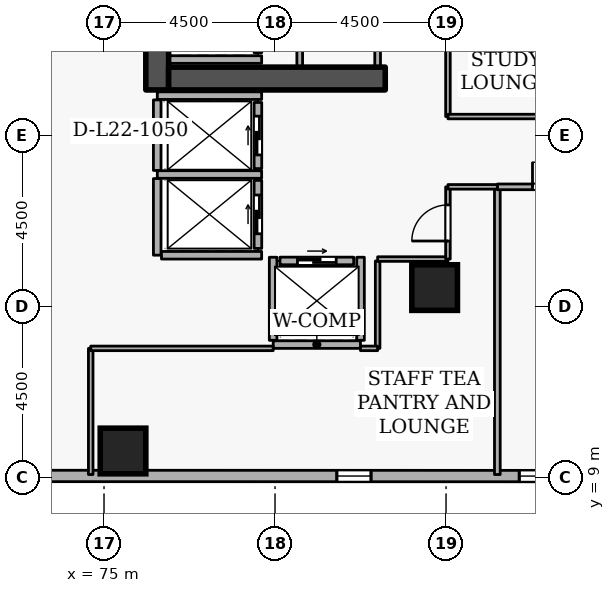
"""IFC4 building model, lengths in metres.
Left out: names, types, materials, properties, quantities, classifications, styles, units other than length and angle.
Written with IfcOpenShell. Run it as: python <this file> out.ifc"""

import sys

from ifc_helpers import new_model, si_unit, direction, frame, frame_2d, origin, origin_2d, place, context, subcontext, project, spatial, rectangle, extrude, element, fill, save


model = new_model("IFC4")
c1 = context("Model", 3, precision=1e-05, world=origin(), true_north=direction((0.0, 1.0)))
c2 = subcontext(c1, "Body", "Model", "MODEL_VIEW")
j1 = project(units=[si_unit("LENGTHUNIT", "METRE"), si_unit("PLANEANGLEUNIT", "RADIAN")], contexts=[c1])
p1 = place(None, origin())
s1 = spatial("IfcSite", under=j1, at=p1, CompositionType="ELEMENT")
p2 = place(p1, origin())
s2 = spatial("IfcBuilding", under=s1, at=p2, CompositionType="ELEMENT")
p3 = place(p2, frame((0.0, 0.0, 87.3)))
s3 = spatial("IfcBuildingStorey", under=s2, at=p3, CompositionType="ELEMENT", Elevation=87.3)
p4 = place(p3, frame((76.4, 19.2, 0.0), z_axis=(0.0, 0.0, 1.0), x_axis=(0.0, 1.0, 0.0)))
e1 = element("IfcWall", 1, at=p4, inside=s3, PredefinedType="SHEAR", context=c2, shape_type="SweptSolid", body=[
    extrude(rectangle(XDim=15.6, YDim=0.6, at=frame_2d((7.8, 0.0))), origin(), (0.0, 0.0, 1.0), 3.6),
])
p5 = place(p3, frame((76.7, 19.5, 0.0), z_axis=(0.0, 0.0, 1.0), x_axis=(1.0, 0.0, 0.0)))
e2 = element("IfcWall", 2, at=p5, inside=s3, PredefinedType="SHEAR", context=c2, shape_type="SweptSolid", body=[
    extrude(rectangle(XDim=5.7, YDim=0.6, at=frame_2d((2.85, 0.0))), origin(), (0.0, 0.0, 1.0), 3.6),
])
for number, where, z_axis, x_axis in (
    (3, (75.5, 9.7, 0.0), (0.0, 0.0, 1.0), (1.0, 0.0, 0.0)),
    (4, (83.7, 14.0, 0.0), (0.0, 0.0, 1.0), (1.0, 0.0, 0.0)),
):
    element("IfcColumn", number, at=place(p3, frame(where, z_axis=z_axis, x_axis=x_axis)), inside=s3, PredefinedType="COLUMN", context=c2, shape_type="SweptSolid", body=[
        extrude(rectangle(XDim=1.2, YDim=1.2, at=origin_2d()), origin(), (0.0, 0.0, 1.0), 3.6),
    ])
p6 = place(p3, frame((69.726, 9.044, 0.0), z_axis=(0.0, 0.0, 1.0), x_axis=(0.999999970468, -0.000243032466, 0.0)))
e5 = element("IfcWall", 5, at=p6, inside=s3, PredefinedType="STANDARD", context=c2, shape_type="SweptSolid", body=[
    extrude(rectangle(XDim=34.155, YDim=0.3, at=frame_2d((17.078, 0.0))), origin(), (0.0, 0.0, 1.0), 2.7),
])
p7 = place(p6, frame((1.8, 0.0, 0.72)))
e6 = element("IfcOpeningElement", 6, at=p7, cuts=e5, PredefinedType="OPENING", context=c2, shape_type="SweptSolid", body=[
    extrude(rectangle(XDim=0.9, YDim=1.75, at=frame_2d((0.45, 0.875))), frame((0.0, 0.16, 0.0), z_axis=(0.0, -1.0, 0.0), x_axis=(1.0, 0.0, 0.0)), (0.0, 0.0, 1.0), 0.32),
])
p8 = place(p6, frame((11.4, 0.0, 0.72)))
e7 = element("IfcOpeningElement", 7, at=p8, cuts=e5, PredefinedType="OPENING", context=c2, shape_type="SweptSolid", body=[
    extrude(rectangle(XDim=0.9, YDim=1.75, at=frame_2d((0.45, 0.875))), frame((0.0, 0.16, 0.0), z_axis=(0.0, -1.0, 0.0), x_axis=(1.0, 0.0, 0.0)), (0.0, 0.0, 1.0), 0.32),
])
p9 = place(p6, frame((16.2, 0.0, 0.72)))
e8 = element("IfcOpeningElement", 8, at=p9, cuts=e5, PredefinedType="OPENING", context=c2, shape_type="SweptSolid", body=[
    extrude(rectangle(XDim=0.9, YDim=1.75, at=frame_2d((0.45, 0.875))), frame((0.0, 0.16, 0.0), z_axis=(0.0, -1.0, 0.0), x_axis=(1.0, 0.0, 0.0)), (0.0, 0.0, 1.0), 0.32),
])
p10 = place(p6, frame((21.0, 0.0, 0.72)))
e9 = element("IfcOpeningElement", 9, at=p10, cuts=e5, PredefinedType="OPENING", context=c2, shape_type="SweptSolid", body=[
    extrude(rectangle(XDim=0.9, YDim=1.75, at=frame_2d((0.45, 0.875))), frame((0.0, 0.16, 0.0), z_axis=(0.0, -1.0, 0.0), x_axis=(1.0, 0.0, 0.0)), (0.0, 0.0, 1.0), 0.32),
])
p11 = place(p6, frame((25.8, 0.0, 0.72)))
e10 = element("IfcOpeningElement", 10, at=p11, cuts=e5, PredefinedType="OPENING", context=c2, shape_type="SweptSolid", body=[
    extrude(rectangle(XDim=0.9, YDim=1.75, at=frame_2d((0.45, 0.875))), frame((0.0, 0.16, 0.0), z_axis=(0.0, -1.0, 0.0), x_axis=(1.0, 0.0, 0.0)), (0.0, 0.0, 1.0), 0.32),
])
p12 = place(p3, frame((79.05, 20.18, 0.0), z_axis=(0.0, 0.0, 1.0), x_axis=(0.0, 1.0, 0.0)))
e11 = element("IfcWall", 11, at=p12, inside=s3, PredefinedType="STANDARD", context=c2, shape_type="SweptSolid", body=[
    extrude(rectangle(XDim=1.94, YDim=0.2, at=frame_2d((0.97, 0.0))), origin(), (0.0, 0.0, 1.0), 3.34),
])
p13 = place(p3, frame((79.05, 17.13, 0.0), z_axis=(0.0, 0.0, 1.0), x_axis=(0.0, 1.0, 0.0)))
e12 = element("IfcWall", 12, at=p13, inside=s3, PredefinedType="STANDARD", context=c2, shape_type="SweptSolid", body=[
    extrude(rectangle(XDim=1.74, YDim=0.2, at=frame_2d((0.87, 0.0))), origin(), (0.0, 0.0, 1.0), 3.34),
])
p14 = place(p13, frame((0.36, 0.0, 0.0)))
e13 = element("IfcOpeningElement", 13, at=p14, cuts=e12, PredefinedType="OPENING", context=c2, shape_type="SweptSolid", body=[
    extrude(rectangle(XDim=1.02, YDim=2.06, at=frame_2d((0.51, 1.03))), frame((0.0, 0.11, 0.0), z_axis=(0.0, -1.0, 0.0), x_axis=(1.0, 0.0, 0.0)), (0.0, 0.0, 1.0), 0.22),
])
p15 = place(p3, frame((79.05, 15.03, 0.0), z_axis=(0.0, 0.0, 1.0), x_axis=(0.0, 1.0, 0.0)))
e14 = element("IfcWall", 14, at=p15, inside=s3, PredefinedType="STANDARD", context=c2, shape_type="SweptSolid", body=[
    extrude(rectangle(XDim=1.79, YDim=0.2, at=frame_2d((0.895, 0.0))), origin(), (0.0, 0.0, 1.0), 3.34),
])
p16 = place(p15, frame((0.385, 0.0, 0.0)))
e15 = element("IfcOpeningElement", 15, at=p16, cuts=e14, PredefinedType="OPENING", context=c2, shape_type="SweptSolid", body=[
    extrude(rectangle(XDim=1.02, YDim=2.06, at=frame_2d((0.51, 1.03))), frame((0.0, 0.11, 0.0), z_axis=(0.0, -1.0, 0.0), x_axis=(1.0, 0.0, 0.0)), (0.0, 0.0, 1.0), 0.22),
])
p17 = place(p3, frame((79.63, 14.7, 0.0), z_axis=(0.0, 0.0, 1.0), x_axis=(1.0, 0.0, 0.0)))
e16 = element("IfcWall", 16, at=p17, inside=s3, PredefinedType="STANDARD", context=c2, shape_type="SweptSolid", body=[
    extrude(rectangle(XDim=1.94, YDim=0.2, at=frame_2d((0.97, 0.0))), origin(), (0.0, 0.0, 1.0), 3.34),
])
p18 = place(p17, frame((0.46, 0.0, 0.0)))
e17 = element("IfcOpeningElement", 17, at=p18, cuts=e16, PredefinedType="OPENING", context=c2, shape_type="SweptSolid", body=[
    extrude(rectangle(XDim=1.02, YDim=2.06, at=frame_2d((0.51, 1.03))), frame((0.0, 0.11, 0.0), z_axis=(0.0, -1.0, 0.0), x_axis=(1.0, 0.0, 0.0)), (0.0, 0.0, 1.0), 0.22),
])
p19 = place(p3, frame((76.712, 20.0, 0.0), z_axis=(0.0, 0.0, 1.0), x_axis=(1.0, 0.0, 0.0)))
e18 = element("IfcWall", 18, at=p19, inside=s3, PredefinedType="STANDARD", context=c2, shape_type="SweptSolid", body=[
    extrude(rectangle(XDim=2.436, YDim=0.2, at=frame_2d((1.218, 0.0))), origin(), (0.0, 0.0, 1.0), 3.34),
])
p20 = place(p3, frame((76.402, 19.05, 0.0), z_axis=(0.0, 0.0, 1.0), x_axis=(1.0, 0.0, 0.0)))
e19 = element("IfcWall", 19, at=p20, inside=s3, PredefinedType="STANDARD", context=c2, shape_type="SweptSolid", body=[
    extrude(rectangle(XDim=2.746, YDim=0.2, at=frame_2d((1.373, 0.0))), origin(), (0.0, 0.0, 1.0), 2.545),
])
p21 = place(p3, frame((76.402, 16.975, 0.0), z_axis=(0.0, 0.0, 1.0), x_axis=(1.0, 0.0, 0.0)))
e20 = element("IfcWall", 20, at=p21, inside=s3, PredefinedType="STANDARD", context=c2, shape_type="SweptSolid", body=[
    extrude(rectangle(XDim=2.746, YDim=0.2, at=frame_2d((1.373, 0.0))), origin(), (0.0, 0.0, 1.0), 3.34),
])
p22 = place(p3, frame((76.4, 14.852, 0.0), z_axis=(0.0, 0.0, 1.0), x_axis=(0.0, 1.0, 0.0)))
e21 = element("IfcWall", 21, at=p22, inside=s3, PredefinedType="STANDARD", context=c2, shape_type="SweptSolid", body=[
    extrude(rectangle(XDim=2.016, YDim=0.2, at=frame_2d((1.008, 0.0))), origin(), (0.0, 0.0, 1.0), 3.34),
])
p23 = place(p3, frame((76.4, 17.082, 0.0), z_axis=(0.0, 0.0, 1.0), x_axis=(0.0, 1.0, 0.0)))
e22 = element("IfcWall", 22, at=p23, inside=s3, PredefinedType="STANDARD", context=c2, shape_type="SweptSolid", body=[
    extrude(rectangle(XDim=1.856, YDim=0.2, at=frame_2d((0.928, 0.0))), origin(), (0.0, 0.0, 1.0), 3.34),
])
p24 = place(p3, frame((76.512, 14.85, 0.0), z_axis=(0.0, 0.0, 1.0), x_axis=(1.0, 0.0, 0.0)))
e23 = element("IfcWall", 23, at=p24, inside=s3, PredefinedType="STANDARD", context=c2, shape_type="SweptSolid", body=[
    extrude(rectangle(XDim=2.636, YDim=0.2, at=frame_2d((1.318, 0.0))), origin(), (0.0, 0.0, 1.0), 3.34),
])
p25 = place(p3, frame((79.452, 12.5, 0.0), z_axis=(0.0, 0.0, 1.0), x_axis=(1.0, 0.0, 0.0)))
e24 = element("IfcWall", 24, at=p25, inside=s3, PredefinedType="STANDARD", context=c2, shape_type="SweptSolid", body=[
    extrude(rectangle(XDim=2.296, YDim=0.2, at=frame_2d((1.148, 0.0))), origin(), (0.0, 0.0, 1.0), 3.34),
])
for number, where, z_axis, x_axis in (
    (25, (81.75, 12.612, 0.0), (0.0, 0.0, 1.0), (0.0, 1.0, 0.0)),
    (26, (79.45, 12.612, 0.0), (0.0, 0.0, 1.0), (0.0, 1.0, 0.0)),
):
    element("IfcWall", number, at=place(p3, frame(where, z_axis=z_axis, x_axis=x_axis)), inside=s3, PredefinedType="STANDARD", context=c2, shape_type="SweptSolid", body=[
        extrude(rectangle(XDim=2.186, YDim=0.2, at=frame_2d((1.093, 0.0))), origin(), (0.0, 0.0, 1.0), 3.34),
    ])
p26 = place(p3, frame((82.2, 19.8, 0.0), z_axis=(0.0, 0.0, 1.0), x_axis=(0.0, 1.0, 0.0)))
e27 = element("IfcWall", 27, at=p26, inside=s3, PredefinedType="PARTITIONING", context=c2, shape_type="SweptSolid", body=[
    extrude(rectangle(XDim=3.3, YDim=0.15, at=frame_2d((1.65, 0.0))), origin(), (0.0, 0.0, 1.0), 3.34),
])
p27 = place(p26, frame((1.19, 0.0, 0.0)))
e28 = element("IfcOpeningElement", 28, at=p27, cuts=e27, PredefinedType="OPENING", context=c2, shape_type="SweptSolid", body=[
    extrude(rectangle(XDim=0.92, YDim=2.08, at=frame_2d((0.46, 1.04))), frame((0.0, 0.085, 0.0), z_axis=(0.0, -1.0, 0.0), x_axis=(1.0, 0.0, 0.0)), (0.0, 0.0, 1.0), 0.17),
])
p28 = place(p3, frame((80.15, 23.1, 0.0), z_axis=(0.0, 0.0, 1.0), x_axis=(0.0, -1.0, 0.0)))
e29 = element("IfcWall", 29, at=p28, inside=s3, PredefinedType="PARTITIONING", context=c2, shape_type="SweptSolid", body=[
    extrude(rectangle(XDim=3.3, YDim=0.15, at=frame_2d((1.65, 0.0))), origin(), (0.0, 0.0, 1.0), 3.34),
])
p29 = place(p3, frame((85.35, 9.08, 0.0), z_axis=(0.0, 0.0, 1.0), x_axis=(0.0, 1.0, 0.0)))
e30 = element("IfcWall", 30, at=p29, inside=s3, PredefinedType="PARTITIONING", context=c2, shape_type="SweptSolid", body=[
    extrude(rectangle(XDim=7.57, YDim=0.15, at=frame_2d((3.785, 0.0))), origin(), (0.0, 0.0, 1.0), 3.34),
])
p30 = place(p3, frame((85.35, 16.65, 0.0), z_axis=(0.0, 0.0, 1.0), x_axis=(1.0, 0.0, 0.0)))
e31 = element("IfcWall", 31, at=p30, inside=s3, PredefinedType="PARTITIONING", context=c2, shape_type="SweptSolid", body=[
    extrude(rectangle(XDim=3.15, YDim=0.15, at=frame_2d((1.575, 0.0))), origin(), (0.0, 0.0, 1.0), 3.34),
])
p31 = place(p30, frame((0.925, 0.0, 0.0)))
e32 = element("IfcOpeningElement", 32, at=p31, cuts=e31, PredefinedType="OPENING", context=c2, shape_type="SweptSolid", body=[
    extrude(rectangle(XDim=1.3, YDim=2.12, at=frame_2d((0.65, 1.06))), frame((0.0, 0.085, 0.0), z_axis=(0.0, -1.0, 0.0), x_axis=(1.0, 0.0, 0.0)), (0.0, 0.0, 1.0), 0.17),
])
p32 = place(p3, frame((82.2, 12.4, 0.0), z_axis=(0.0, 0.0, 1.0), x_axis=(0.0, 1.0, 0.0)))
e33 = element("IfcWall", 33, at=p32, inside=s3, PredefinedType="PARTITIONING", context=c2, shape_type="SweptSolid", body=[
    extrude(rectangle(XDim=2.3, YDim=0.12, at=frame_2d((1.15, 0.0))), origin(), (0.0, 0.0, 1.0), 3.34),
])
p33 = place(p3, frame((82.2, 14.75, 0.0), z_axis=(0.0, 0.0, 1.0), x_axis=(1.0, 0.0, 0.0)))
e34 = element("IfcWall", 34, at=p33, inside=s3, PredefinedType="PARTITIONING", context=c2, shape_type="SweptSolid", body=[
    extrude(rectangle(XDim=1.85, YDim=0.12, at=frame_2d((0.925, 0.0))), origin(), (0.0, 0.0, 1.0), 3.34),
])
p34 = place(p3, frame((84.05, 14.75, 0.0), z_axis=(0.0, 0.0, 1.0), x_axis=(0.0, 1.0, 0.0)))
e35 = element("IfcWall", 35, at=p34, inside=s3, PredefinedType="PARTITIONING", context=c2, shape_type="SweptSolid", body=[
    extrude(rectangle(XDim=1.9, YDim=0.12, at=frame_2d((0.95, 0.0))), origin(), (0.0, 0.0, 1.0), 3.34),
])
p35 = place(p34, frame((0.475, 0.0, 0.0)))
e36 = element("IfcOpeningElement", 36, at=p35, cuts=e35, PredefinedType="OPENING", context=c2, shape_type="SweptSolid", body=[
    extrude(rectangle(XDim=0.95, YDim=2.1, at=frame_2d((0.475, 1.05))), frame((0.0, 0.07, 0.0), z_axis=(0.0, -1.0, 0.0), x_axis=(1.0, 0.0, 0.0)), (0.0, 0.0, 1.0), 0.14),
])
p36 = place(p3, frame((84.05, 16.65, 0.0), z_axis=(0.0, 0.0, 1.0), x_axis=(1.0, 0.0, 0.0)))
e37 = element("IfcWall", 37, at=p36, inside=s3, PredefinedType="PARTITIONING", context=c2, shape_type="SweptSolid", body=[
    extrude(rectangle(XDim=1.3, YDim=0.12, at=frame_2d((0.65, 0.0))), origin(), (0.0, 0.0, 1.0), 3.34),
])
p37 = place(p3, frame((74.65, 9.08, 0.0), z_axis=(0.0, 0.0, 1.0), x_axis=(0.0, 1.0, 0.0)))
e38 = element("IfcWall", 38, at=p37, inside=s3, PredefinedType="PARTITIONING", context=c2, shape_type="SweptSolid", body=[
    extrude(rectangle(XDim=3.32, YDim=0.12, at=frame_2d((1.66, 0.0))), origin(), (0.0, 0.0, 1.0), 3.34),
])
p38 = place(p3, frame((74.65, 12.4, 0.0), z_axis=(0.0, 0.0, 1.0), x_axis=(1.0, 0.0, 0.0)))
e39 = element("IfcWall", 39, at=p38, inside=s3, PredefinedType="PARTITIONING", context=c2, shape_type="SweptSolid", body=[
    extrude(rectangle(XDim=4.802, YDim=0.12, at=frame_2d((2.401, 0.0))), origin(), (0.0, 0.0, 1.0), 3.34),
])
p39 = place(p3, frame((81.748, 12.4, 0.0), z_axis=(0.0, 0.0, 1.0), x_axis=(1.0, 0.0, 0.0)))
e40 = element("IfcWall", 40, at=p39, inside=s3, PredefinedType="PARTITIONING", context=c2, shape_type="SweptSolid", body=[
    extrude(rectangle(XDim=0.452, YDim=0.12, at=frame_2d((0.226, 0.0))), origin(), (0.0, 0.0, 1.0), 3.34),
])
p40 = place(p3, frame((84.05, 18.5, 0.0), z_axis=(0.0, 0.0, 1.0), x_axis=(0.0, 1.0, 0.0)))
e41 = element("IfcWall", 41, at=p40, inside=s3, PredefinedType="PARTITIONING", context=c2, shape_type="SweptSolid", body=[
    extrude(rectangle(XDim=3.3, YDim=0.12, at=frame_2d((1.65, 0.0))), origin(), (0.0, 0.0, 1.0), 3.34),
])
p41 = place(p3, frame((92.95, 18.5, 0.0), z_axis=(0.0, 0.0, 1.0), x_axis=(-1.0, 0.0, 0.0)))
e42 = element("IfcWall", 42, at=p41, inside=s3, PredefinedType="PARTITIONING", context=c2, shape_type="SweptSolid", body=[
    extrude(rectangle(XDim=8.9, YDim=0.12, at=frame_2d((4.45, 0.0))), origin(), (0.0, 0.0, 1.0), 3.34),
])
p42 = place(p41, frame((3.975, 0.0, 0.0)))
e43 = element("IfcOpeningElement", 43, at=p42, cuts=e42, PredefinedType="OPENING", context=c2, shape_type="SweptSolid", body=[
    extrude(rectangle(XDim=0.95, YDim=2.1, at=frame_2d((0.475, 1.05))), frame((0.0, 0.07, 0.0), z_axis=(0.0, -1.0, 0.0), x_axis=(1.0, 0.0, 0.0)), (0.0, 0.0, 1.0), 0.14),
])
p43 = place(p8, origin())
e44 = element("IfcWindow", 44, at=p43, inside=s3, PartitioningType="SINGLE_PANEL", PredefinedType="WINDOW", context=c2, shape_type="SweptSolid", body=[
    extrude(rectangle(XDim=0.9, YDim=1.75, at=frame_2d((0.45, 0.875))), frame((0.0, 0.03, 0.0), z_axis=(0.0, -1.0, 0.0), x_axis=(1.0, 0.0, 0.0)), (0.0, 0.0, 1.0), 0.06),
])
fill(e7, e44)
p44 = place(p9, origin())
e45 = element("IfcWindow", 45, at=p44, inside=s3, PartitioningType="SINGLE_PANEL", PredefinedType="WINDOW", context=c2, shape_type="SweptSolid", body=[
    extrude(rectangle(XDim=0.9, YDim=1.75, at=frame_2d((0.45, 0.875))), frame((0.0, 0.03, 0.0), z_axis=(0.0, -1.0, 0.0), x_axis=(1.0, 0.0, 0.0)), (0.0, 0.0, 1.0), 0.06),
])
fill(e8, e45)
p45 = place(p14, origin())
e46 = element("IfcDoor", 46, at=p45, inside=s3, OperationType="SLIDING_TO_LEFT", PredefinedType="DOOR", context=c2, shape_type="SweptSolid", body=[
    extrude(rectangle(XDim=1.02, YDim=2.06, at=frame_2d((0.51, 1.03))), frame((0.0, 0.025, 0.0), z_axis=(0.0, -1.0, 0.0), x_axis=(1.0, 0.0, 0.0)), (0.0, 0.0, 1.0), 0.05),
])
fill(e13, e46)
p46 = place(p16, origin())
e47 = element("IfcDoor", 47, at=p46, inside=s3, OperationType="SLIDING_TO_LEFT", PredefinedType="DOOR", context=c2, shape_type="SweptSolid", body=[
    extrude(rectangle(XDim=1.02, YDim=2.06, at=frame_2d((0.51, 1.03))), frame((0.0, 0.025, 0.0), z_axis=(0.0, -1.0, 0.0), x_axis=(1.0, 0.0, 0.0)), (0.0, 0.0, 1.0), 0.05),
])
fill(e15, e47)
p47 = place(p18, origin())
e48 = element("IfcDoor", 48, at=p47, inside=s3, OperationType="SLIDING_TO_LEFT", PredefinedType="DOOR", context=c2, shape_type="SweptSolid", body=[
    extrude(rectangle(XDim=1.02, YDim=2.06, at=frame_2d((0.51, 1.03))), frame((0.0, 0.025, 0.0), z_axis=(0.0, -1.0, 0.0), x_axis=(1.0, 0.0, 0.0)), (0.0, 0.0, 1.0), 0.05),
])
fill(e17, e48)
p48 = place(p31, origin())
e49 = element("IfcDoor", 49, at=p48, inside=s3, OperationType="DOUBLE_DOOR_SINGLE_SWING", PredefinedType="DOOR", context=c2, shape_type="SweptSolid", body=[
    extrude(rectangle(XDim=1.3, YDim=2.12, at=frame_2d((0.65, 1.06))), frame((0.0, 0.025, 0.0), z_axis=(0.0, -1.0, 0.0), x_axis=(1.0, 0.0, 0.0)), (0.0, 0.0, 1.0), 0.05),
])
fill(e32, e49)
p49 = place(p35, origin())
e50 = element("IfcDoor", 50, at=p49, inside=s3, OperationType="SINGLE_SWING_LEFT", PredefinedType="DOOR", context=c2, shape_type="SweptSolid", body=[
    extrude(rectangle(XDim=0.95, YDim=2.1, at=frame_2d((0.475, 1.05))), frame((0.0, 0.025, 0.0), z_axis=(0.0, -1.0, 0.0), x_axis=(1.0, 0.0, 0.0)), (0.0, 0.0, 1.0), 0.05),
])
fill(e36, e50)
save(model, sys.argv[1])
